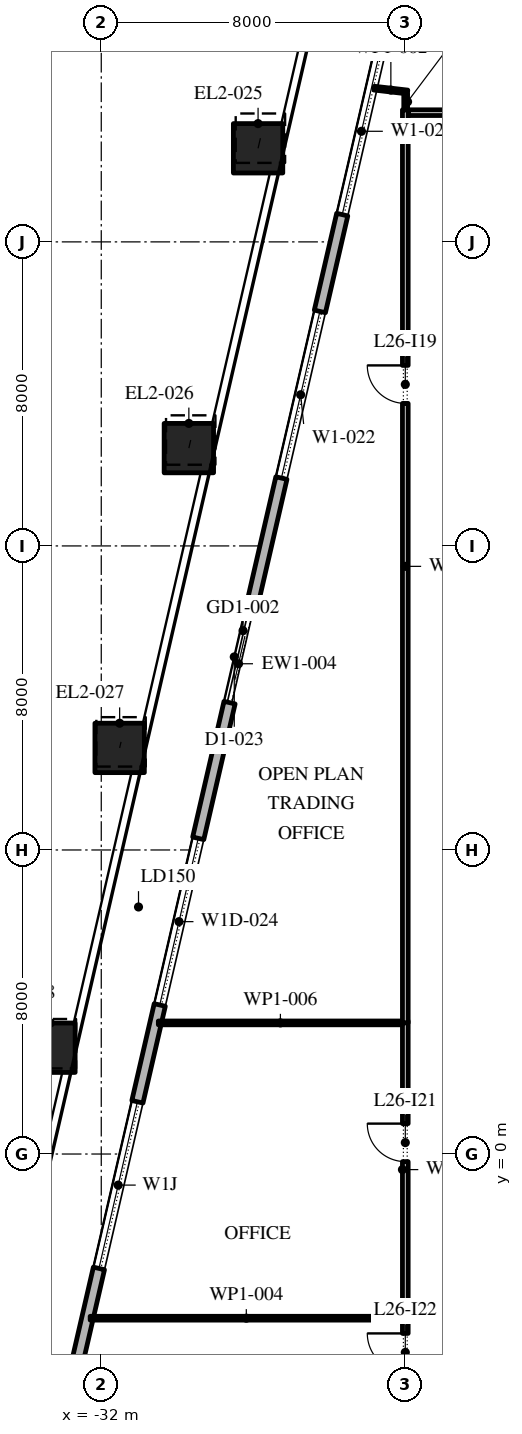
"""IFC4 building model, lengths in metres.
Left out: names, types, materials, properties, quantities, classifications, styles, units other than length and angle.
Written with IfcOpenShell. Run it as: python <this file> out.ifc"""

import sys

from ifc_helpers import new_model, si_unit, direction, frame, frame_2d, origin, origin_2d, place, context, subcontext, project, spatial, rectangle, extrude, element, fill, save


model = new_model("IFC4")
c1 = context("Model", 3, precision=1e-05, world=origin(), true_north=direction((0.0, 1.0)))
c2 = subcontext(c1, "Body", "Model", "MODEL_VIEW")
j1 = project(units=[si_unit("LENGTHUNIT", "METRE"), si_unit("PLANEANGLEUNIT", "RADIAN")], contexts=[c1])
p1 = place(None, origin())
s1 = spatial("IfcSite", under=j1, at=p1, CompositionType="ELEMENT")
p2 = place(p1, origin())
s2 = spatial("IfcBuilding", under=s1, at=p2, CompositionType="ELEMENT")
p3 = place(p2, frame((0.0, 0.0, 122.4)))
s3 = spatial("IfcBuildingStorey", under=s2, at=p3, CompositionType="ELEMENT", Elevation=122.4)
p4 = place(p3, frame((-27.874, 26.462, 0.0), z_axis=(0.014558999143, 0.063108330945, 0.997900483069), x_axis=(-0.97440628778, 0.224794097641, 0.0)))
e1 = element("IfcColumn", 1, at=p4, inside=s3, PredefinedType="COLUMN", context=c2, shape_type="SweptSolid", body=[
    extrude(rectangle(XDim=1.3, YDim=1.3, at=origin_2d()), origin(), (0.0, 0.0, 1.0), 4.209),
])
p5 = place(p3, frame((-29.695, 18.574, 0.0), z_axis=(0.011667590749, 0.050559559912, 0.998652891764), x_axis=(-0.974391195695, 0.224859506699, 0.0)))
e2 = element("IfcColumn", 2, at=p5, inside=s3, PredefinedType="COLUMN", context=c2, shape_type="SweptSolid", body=[
    extrude(rectangle(XDim=1.3, YDim=1.3, at=origin_2d()), origin(), (0.0, 0.0, 1.0), 4.206),
])
p6 = place(p3, frame((-31.516, 10.685, 0.0), z_axis=(0.008770394957, 0.037869519945, 0.999244204202), x_axis=(-0.974214614928, 0.225623323396, 0.0)))
e3 = element("IfcColumn", 3, at=p6, inside=s3, PredefinedType="COLUMN", context=c2, shape_type="SweptSolid", body=[
    extrude(rectangle(XDim=1.3, YDim=1.3, at=origin_2d()), origin(), (0.0, 0.0, 1.0), 4.203),
])
p7 = place(p3, frame((-33.337, 2.797, 0.0), z_axis=(0.005810646452, 0.025276312067, 0.999663615641), x_axis=(-0.974579651079, 0.224041299099, 0.0)))
e4 = element("IfcColumn", 4, at=p7, inside=s3, PredefinedType="COLUMN", context=c2, shape_type="SweptSolid", body=[
    extrude(rectangle(XDim=1.3, YDim=1.3, at=origin_2d()), origin(), (0.0, 0.0, 1.0), 4.202),
])
p8 = place(p3, frame((-22.82, 37.016, 0.0), z_axis=(0.0, 0.0, 1.0), x_axis=(-0.224953880882, -0.974369412223, 0.0)))
e5 = element("IfcWall", 5, at=p8, inside=s3, PredefinedType="STANDARD", context=c2, shape_type="SweptSolid", body=[
    extrude(rectangle(XDim=49.5, YDim=0.3, at=frame_2d((24.75, 0.0))), origin(), (0.0, 0.0, 1.0), 4.0),
])
p9 = place(p8, frame((1.157, 0.0, 0.45)))
e6 = element("IfcOpeningElement", 6, at=p9, cuts=e5, PredefinedType="OPENING", context=c2, shape_type="SweptSolid", body=[
    extrude(rectangle(XDim=4.5, YDim=3.05, at=frame_2d((2.25, 1.525))), frame((0.0, 0.16, 0.0), z_axis=(0.0, -1.0, 0.0), x_axis=(1.0, 0.0, 0.0)), (0.0, 0.0, 1.0), 0.32),
])
p10 = place(p8, frame((8.121, 0.0, 0.45)))
e7 = element("IfcOpeningElement", 7, at=p10, cuts=e5, PredefinedType="OPENING", context=c2, shape_type="SweptSolid", body=[
    extrude(rectangle(XDim=4.5, YDim=3.05, at=frame_2d((2.25, 1.525))), frame((0.0, 0.16, 0.0), z_axis=(0.0, -1.0, 0.0), x_axis=(1.0, 0.0, 0.0)), (0.0, 0.0, 1.0), 0.32),
])
p11 = place(p8, frame((15.236, 0.0, 0.45)))
e8 = element("IfcOpeningElement", 8, at=p11, cuts=e5, PredefinedType="OPENING", context=c2, shape_type="SweptSolid", body=[
    extrude(rectangle(XDim=4.5, YDim=3.05, at=frame_2d((2.25, 1.525))), frame((0.0, 0.16, 0.0), z_axis=(0.0, -1.0, 0.0), x_axis=(1.0, 0.0, 0.0)), (0.0, 0.0, 1.0), 0.32),
])
p12 = place(p8, frame((23.4, 0.0, 0.0)))
e9 = element("IfcOpeningElement", 9, at=p12, cuts=e5, PredefinedType="OPENING", context=c2, shape_type="SweptSolid", body=[
    extrude(rectangle(XDim=2.4, YDim=3.5, at=frame_2d((1.2, 1.75))), frame((0.0, 0.16, 0.0), z_axis=(0.0, -1.0, 0.0), x_axis=(1.0, 0.0, 0.0)), (0.0, 0.0, 1.0), 0.32),
])
p13 = place(p8, frame((29.464, 0.0, 0.45)))
e10 = element("IfcOpeningElement", 10, at=p13, cuts=e5, PredefinedType="OPENING", context=c2, shape_type="SweptSolid", body=[
    extrude(rectangle(XDim=4.5, YDim=2.875, at=frame_2d((2.25, 1.438))), frame((0.0, 0.16, 0.0), z_axis=(0.0, -1.0, 0.0), x_axis=(1.0, 0.0, 0.0)), (0.0, 0.0, 1.0), 0.32),
])
p14 = place(p8, frame((36.579, 0.0, 0.45)))
e11 = element("IfcOpeningElement", 11, at=p14, cuts=e5, PredefinedType="OPENING", context=c2, shape_type="SweptSolid", body=[
    extrude(rectangle(XDim=4.5, YDim=2.675, at=frame_2d((2.25, 1.337))), frame((0.0, 0.16, 0.0), z_axis=(0.0, -1.0, 0.0), x_axis=(1.0, 0.0, 0.0)), (0.0, 0.0, 1.0), 0.32),
])
p15 = place(p8, frame((43.693, 0.0, 0.45)))
e12 = element("IfcOpeningElement", 12, at=p15, cuts=e5, PredefinedType="OPENING", context=c2, shape_type="SweptSolid", body=[
    extrude(rectangle(XDim=4.5, YDim=3.05, at=frame_2d((2.25, 1.525))), frame((0.0, 0.16, 0.0), z_axis=(0.0, -1.0, 0.0), x_axis=(1.0, 0.0, 0.0)), (0.0, 0.0, 1.0), 0.32),
])
p16 = place(p3, frame((-24.82, 28.045, 0.0), z_axis=(0.0, 0.0, 1.0), x_axis=(0.993501545499, -0.113818623659, 0.0)))
e13 = element("IfcWall", 13, at=p16, inside=s3, PredefinedType="PARTITIONING", context=c2, shape_type="SweptSolid", body=[
    extrude(rectangle(XDim=0.886, YDim=0.1, at=frame_2d((0.443, 0.0))), origin(), (0.0, 0.0, 1.0), 4.0),
])
p17 = place(p3, frame((-24.0, -7.775, 0.0), z_axis=(0.0, 0.0, 1.0), x_axis=(0.0, 1.0, 0.0)))
e14 = element("IfcWall", 14, at=p17, inside=s3, PredefinedType="PARTITIONING", context=c2, shape_type="SweptSolid", body=[
    extrude(rectangle(XDim=3.455, YDim=0.15, at=frame_2d((1.728, 0.0))), origin(), (0.0, 0.0, 1.0), 4.0),
])
p18 = place(p17, frame((2.055, 0.0, 0.0)))
e15 = element("IfcOpeningElement", 15, at=p18, cuts=e14, PredefinedType="OPENING", context=c2, shape_type="SweptSolid", body=[
    extrude(rectangle(XDim=1.0, YDim=2.1, at=frame_2d((0.5, 1.05))), frame((0.0, 0.085, 0.0), z_axis=(0.0, -1.0, 0.0), x_axis=(1.0, 0.0, 0.0)), (0.0, 0.0, 1.0), 0.17),
])
p19 = place(p3, frame((-24.075, -4.32, 0.0), z_axis=(0.0, 0.0, 1.0), x_axis=(-1.0, 0.0, 0.0)))
e16 = element("IfcWall", 16, at=p19, inside=s3, PredefinedType="PARTITIONING", context=c2, shape_type="SweptSolid", body=[
    extrude(rectangle(XDim=8.217, YDim=0.1, at=frame_2d((4.108, 0.0))), origin(), (0.0, 0.0, 1.0), 4.0),
])
p20 = place(p3, frame((-24.0, -4.32, 0.0), z_axis=(0.0, 0.0, 1.0), x_axis=(0.0, 1.0, 0.0)))
e17 = element("IfcWall", 17, at=p20, inside=s3, PredefinedType="PARTITIONING", context=c2, shape_type="SweptSolid", body=[
    extrude(rectangle(XDim=7.82, YDim=0.15, at=frame_2d((3.91, 0.0))), origin(), (0.0, 0.0, 1.0), 4.0),
])
p21 = place(p20, frame((4.12, 0.0, 0.0)))
e18 = element("IfcOpeningElement", 18, at=p21, cuts=e17, PredefinedType="OPENING", context=c2, shape_type="SweptSolid", body=[
    extrude(rectangle(XDim=1.0, YDim=2.1, at=frame_2d((0.5, 1.05))), frame((0.0, 0.085, 0.0), z_axis=(0.0, -1.0, 0.0), x_axis=(1.0, 0.0, 0.0)), (0.0, 0.0, 1.0), 0.17),
])
p22 = place(p3, frame((-24.075, 3.45, 0.0), z_axis=(0.0, 0.0, 1.0), x_axis=(-1.0, 0.0, 0.0)))
e19 = element("IfcWall", 19, at=p22, inside=s3, PredefinedType="PARTITIONING", context=c2, shape_type="SweptSolid", body=[
    extrude(rectangle(XDim=6.423, YDim=0.1, at=frame_2d((3.211, 0.0))), origin(), (0.0, 0.0, 1.0), 4.0),
])
p23 = place(p3, frame((-24.0, 3.45, 0.0), z_axis=(0.0, 0.0, 1.0), x_axis=(0.0, 1.0, 0.0)))
e20 = element("IfcWall", 20, at=p23, inside=s3, PredefinedType="PARTITIONING", context=c2, shape_type="SweptSolid", body=[
    extrude(rectangle(XDim=24.025, YDim=0.15, at=frame_2d((12.013, 0.0))), origin(), (0.0, 0.0, 1.0), 4.0),
])
p24 = place(p23, frame((16.3, 0.0, 0.0)))
e21 = element("IfcOpeningElement", 21, at=p24, cuts=e20, PredefinedType="OPENING", context=c2, shape_type="SweptSolid", body=[
    extrude(rectangle(XDim=1.0, YDim=2.1, at=frame_2d((0.5, 1.05))), frame((0.0, 0.085, 0.0), z_axis=(0.0, -1.0, 0.0), x_axis=(1.0, 0.0, 0.0)), (0.0, 0.0, 1.0), 0.17),
])
p25 = place(p3, frame((-23.99, 27.475, 0.0), z_axis=(0.0, 0.0, 1.0), x_axis=(0.0, 1.0, 0.0)))
e22 = element("IfcWall", 22, at=p25, inside=s3, PredefinedType="PARTITIONING", context=c2, shape_type="SweptSolid", body=[
    extrude(rectangle(XDim=0.425, YDim=0.1, at=frame_2d((0.212, 0.0))), origin(), (0.0, 0.0, 1.0), 4.0),
])
p26 = place(p3, frame((-23.915, 27.4, 0.0), z_axis=(0.0, 0.0, 1.0), x_axis=(1.0, 0.0, 0.0)))
e23 = element("IfcWall", 23, at=p26, inside=s3, PredefinedType="PARTITIONING", context=c2, shape_type="SweptSolid", body=[
    extrude(rectangle(XDim=9.295, YDim=0.15, at=frame_2d((4.647, 0.0))), origin(), (0.0, 0.0, 1.0), 4.0),
])
p27 = place(p26, frame((3.095, 0.0, 0.0)))
e24 = element("IfcOpeningElement", 24, at=p27, cuts=e23, PredefinedType="OPENING", context=c2, shape_type="SweptSolid", body=[
    extrude(rectangle(XDim=1.0, YDim=2.1, at=frame_2d((0.5, 1.05))), frame((0.0, 0.085, 0.0), z_axis=(0.0, -1.0, 0.0), x_axis=(1.0, 0.0, 0.0)), (0.0, 0.0, 1.0), 0.17),
])
p28 = place(p10, origin())
e25 = element("IfcWindow", 25, at=p28, inside=s3, PartitioningType="DOUBLE_PANEL_VERTICAL", PredefinedType="WINDOW", context=c2, shape_type="SweptSolid", body=[
    extrude(rectangle(XDim=4.5, YDim=3.05, at=frame_2d((2.25, 1.525))), frame((0.0, 0.03, 0.0), z_axis=(0.0, -1.0, 0.0), x_axis=(1.0, 0.0, 0.0)), (0.0, 0.0, 1.0), 0.06),
])
fill(e7, e25)
p29 = place(p11, origin())
e26 = element("IfcWindow", 26, at=p29, inside=s3, PartitioningType="DOUBLE_PANEL_VERTICAL", PredefinedType="WINDOW", context=c2, shape_type="SweptSolid", body=[
    extrude(rectangle(XDim=4.5, YDim=3.05, at=frame_2d((2.25, 1.525))), frame((0.0, 0.03, 0.0), z_axis=(0.0, -1.0, 0.0), x_axis=(1.0, 0.0, 0.0)), (0.0, 0.0, 1.0), 0.06),
])
fill(e8, e26)
p30 = place(p12, origin())
e27 = element("IfcDoor", 27, at=p30, inside=s3, OperationType="DOUBLE_DOOR_SLIDING", PredefinedType="DOOR", context=c2, shape_type="SweptSolid", body=[
    extrude(rectangle(XDim=2.4, YDim=3.5, at=frame_2d((1.2, 1.75))), frame((0.0, 0.025, 0.0), z_axis=(0.0, -1.0, 0.0), x_axis=(1.0, 0.0, 0.0)), (0.0, 0.0, 1.0), 0.05),
])
fill(e9, e27)
p31 = place(p13, origin())
e28 = element("IfcWindow", 28, at=p31, inside=s3, PartitioningType="DOUBLE_PANEL_VERTICAL", PredefinedType="WINDOW", context=c2, shape_type="SweptSolid", body=[
    extrude(rectangle(XDim=4.5, YDim=2.875, at=frame_2d((2.25, 1.438))), frame((0.0, 0.03, 0.0), z_axis=(0.0, -1.0, 0.0), x_axis=(1.0, 0.0, 0.0)), (0.0, 0.0, 1.0), 0.06),
])
fill(e10, e28)
p32 = place(p14, origin())
e29 = element("IfcWindow", 29, at=p32, inside=s3, PartitioningType="DOUBLE_PANEL_VERTICAL", PredefinedType="WINDOW", context=c2, shape_type="SweptSolid", body=[
    extrude(rectangle(XDim=4.5, YDim=2.675, at=frame_2d((2.25, 1.337))), frame((0.0, 0.03, 0.0), z_axis=(0.0, -1.0, 0.0), x_axis=(1.0, 0.0, 0.0)), (0.0, 0.0, 1.0), 0.06),
])
fill(e11, e29)
p33 = place(p24, origin())
e30 = element("IfcDoor", 30, at=p33, inside=s3, OperationType="SINGLE_SWING_LEFT", PredefinedType="DOOR", context=c2, shape_type="SweptSolid", body=[
    extrude(rectangle(XDim=1.0, YDim=2.1, at=frame_2d((0.5, 1.05))), frame((0.0, 0.025, 0.0), z_axis=(0.0, -1.0, 0.0), x_axis=(1.0, 0.0, 0.0)), (0.0, 0.0, 1.0), 0.05),
])
fill(e21, e30)
p34 = place(p21, origin())
e31 = element("IfcDoor", 31, at=p34, inside=s3, OperationType="SINGLE_SWING_LEFT", PredefinedType="DOOR", context=c2, shape_type="SweptSolid", body=[
    extrude(rectangle(XDim=1.0, YDim=2.1, at=frame_2d((0.5, 1.05))), frame((0.0, 0.025, 0.0), z_axis=(0.0, -1.0, 0.0), x_axis=(1.0, 0.0, 0.0)), (0.0, 0.0, 1.0), 0.05),
])
fill(e18, e31)
p35 = place(p18, origin())
e32 = element("IfcDoor", 32, at=p35, inside=s3, OperationType="SINGLE_SWING_LEFT", PredefinedType="DOOR", context=c2, shape_type="SweptSolid", body=[
    extrude(rectangle(XDim=1.0, YDim=2.1, at=frame_2d((0.5, 1.05))), frame((0.0, 0.025, 0.0), z_axis=(0.0, -1.0, 0.0), x_axis=(1.0, 0.0, 0.0)), (0.0, 0.0, 1.0), 0.05),
])
fill(e15, e32)
save(model, sys.argv[1])
